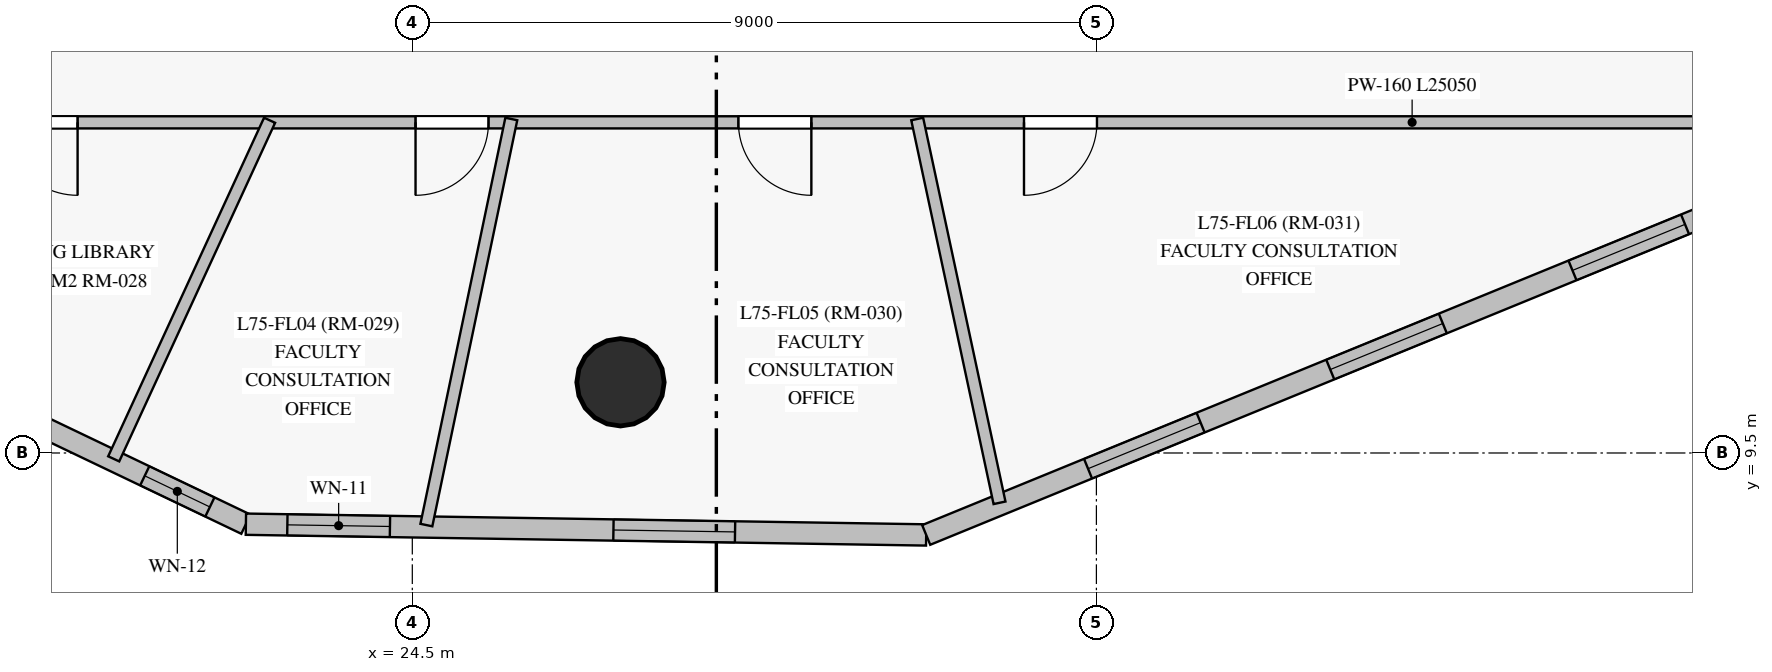
"""IFC4 building model, lengths in metres.
Left out: names, types, materials, properties, quantities, classifications, styles, units other than length and angle.
Written with IfcOpenShell. Run it as: python <this file> out.ifc"""

import sys

from ifc_helpers import new_model, si_unit, direction, frame, frame_2d, origin, origin_with_axes, origin_2d, place, context, subcontext, project, spatial, rectangle, circle, extrude, source, transform, mapped, element, fill, save


model = new_model("IFC4")
c1 = context("Model", 3, precision=1e-05, world=origin(), true_north=direction((0.0, 1.0)))
c2 = subcontext(c1, "Body", "Model", "MODEL_VIEW")
j1 = project(units=[si_unit("LENGTHUNIT", "METRE"), si_unit("PLANEANGLEUNIT", "RADIAN")], contexts=[c1])
p1 = place(None, origin())
s1 = spatial("IfcSite", under=j1, at=p1, CompositionType="ELEMENT")
p2 = place(p1, origin())
s2 = spatial("IfcBuilding", under=s1, at=p2, CompositionType="ELEMENT")
p3 = place(p2, frame((0.0, 0.0, 253.5)))
s3 = spatial("IfcBuildingStorey", under=s2, at=p3, CompositionType="ELEMENT", Elevation=253.5)
m1 = source(origin_with_axes(), c2, "Body", "SweptSolid", [
    extrude(circle(Radius=0.575, at=origin_2d()), origin(), (0.0, 0.0, 1.0), 3.05),
])
p4 = place(p3, frame((27.239, 10.43, 0.0), z_axis=(0.0, 0.0, 1.0), x_axis=(1.0, 0.0, 0.0)))
e1 = element("IfcColumn", 1, at=p4, inside=s3, PredefinedType="COLUMN", context=c2, shape_type="MappedRepresentation", body=[
    mapped(m1, transform((0.0, 0.0, 0.0), scale=1.0)),
])
p5 = place(p3, frame((12.027, 13.482, 0.0), z_axis=(0.0, 0.0, 1.0), x_axis=(0.902132409452, -0.431459286395, 0.0)))
e2 = element("IfcWall", 2, at=p5, inside=s3, PredefinedType="SOLIDWALL", context=c2, shape_type="SweptSolid", body=[
    extrude(rectangle(XDim=11.4, YDim=0.28, at=frame_2d((5.7, 0.0))), origin(), (0.0, 0.0, 1.0), 2.85),
])
p6 = place(p5, frame((1.77, 0.0, 0.85)))
e3 = element("IfcOpeningElement", 3, at=p6, cuts=e2, PredefinedType="OPENING", context=c2, shape_type="SweptSolid", body=[
    extrude(rectangle(XDim=1.6, YDim=1.6, at=frame_2d((0.8, 0.8))), frame((0.0, 0.15, 0.0), z_axis=(0.0, -1.0, 0.0), x_axis=(1.0, 0.0, 0.0)), (0.0, 0.0, 1.0), 0.3),
])
p7 = place(p5, frame((6.149, 0.0, 0.85)))
e4 = element("IfcOpeningElement", 4, at=p7, cuts=e2, PredefinedType="OPENING", context=c2, shape_type="SweptSolid", body=[
    extrude(rectangle(XDim=1.6, YDim=1.6, at=frame_2d((0.8, 0.8))), frame((0.0, 0.15, 0.0), z_axis=(0.0, -1.0, 0.0), x_axis=(1.0, 0.0, 0.0)), (0.0, 0.0, 1.0), 0.3),
])
p8 = place(p5, frame((9.924, 0.0, 0.85)))
e5 = element("IfcOpeningElement", 5, at=p8, cuts=e2, PredefinedType="OPENING", context=c2, shape_type="SweptSolid", body=[
    extrude(rectangle(XDim=0.95, YDim=1.5, at=frame_2d((0.475, 0.75))), frame((0.0, 0.15, 0.0), z_axis=(0.0, -1.0, 0.0), x_axis=(1.0, 0.0, 0.0)), (0.0, 0.0, 1.0), 0.3),
])
p9 = place(p3, frame((22.311, 8.563, 0.0), z_axis=(0.0, 0.0, 1.0), x_axis=(0.999875294772, -0.015792241896, 0.0)))
e6 = element("IfcWall", 6, at=p9, inside=s3, PredefinedType="SOLIDWALL", context=c2, shape_type="SweptSolid", body=[
    extrude(rectangle(XDim=8.951, YDim=0.28, at=frame_2d((4.476, 0.0))), origin(), (0.0, 0.0, 1.0), 2.85),
])
p10 = place(p9, frame((0.545, 0.0, 0.85)))
e7 = element("IfcOpeningElement", 7, at=p10, cuts=e6, PredefinedType="OPENING", context=c2, shape_type="SweptSolid", body=[
    extrude(rectangle(XDim=1.35, YDim=1.6, at=frame_2d((0.675, 0.8))), frame((0.0, 0.15, 0.0), z_axis=(0.0, -1.0, 0.0), x_axis=(1.0, 0.0, 0.0)), (0.0, 0.0, 1.0), 0.3),
])
p11 = place(p9, frame((4.836, 0.0, 0.85)))
e8 = element("IfcOpeningElement", 8, at=p11, cuts=e6, PredefinedType="OPENING", context=c2, shape_type="SweptSolid", body=[
    extrude(rectangle(XDim=1.6, YDim=1.6, at=frame_2d((0.8, 0.8))), frame((0.0, 0.15, 0.0), z_axis=(0.0, -1.0, 0.0), x_axis=(1.0, 0.0, 0.0)), (0.0, 0.0, 1.0), 0.3),
])
p12 = place(p3, frame((31.261, 8.422, 0.0), z_axis=(0.0, 0.0, 1.0), x_axis=(0.925486144164, 0.378781463328, 0.0)))
e9 = element("IfcWall", 9, at=p12, inside=s3, PredefinedType="SOLIDWALL", context=c2, shape_type="SweptSolid", body=[
    extrude(rectangle(XDim=12.089, YDim=0.28, at=frame_2d((6.044, 0.0))), origin(), (0.0, 0.0, 1.0), 2.85),
])
p13 = place(p12, frame((2.301, 0.0, 0.85)))
e10 = element("IfcOpeningElement", 10, at=p13, cuts=e9, PredefinedType="OPENING", context=c2, shape_type="SweptSolid", body=[
    extrude(rectangle(XDim=1.6, YDim=1.6, at=frame_2d((0.8, 0.8))), frame((0.0, 0.15, 0.0), z_axis=(0.0, -1.0, 0.0), x_axis=(1.0, 0.0, 0.0)), (0.0, 0.0, 1.0), 0.3),
])
p14 = place(p12, frame((5.744, 0.0, 0.85)))
e11 = element("IfcOpeningElement", 11, at=p14, cuts=e9, PredefinedType="OPENING", context=c2, shape_type="SweptSolid", body=[
    extrude(rectangle(XDim=1.6, YDim=1.6, at=frame_2d((0.8, 0.8))), frame((0.0, 0.15, 0.0), z_axis=(0.0, -1.0, 0.0), x_axis=(1.0, 0.0, 0.0)), (0.0, 0.0, 1.0), 0.3),
])
p15 = place(p12, frame((9.187, 0.0, 0.85)))
e12 = element("IfcOpeningElement", 12, at=p15, cuts=e9, PredefinedType="OPENING", context=c2, shape_type="SweptSolid", body=[
    extrude(rectangle(XDim=1.6, YDim=1.6, at=frame_2d((0.8, 0.8))), frame((0.0, 0.15, 0.0), z_axis=(0.0, -1.0, 0.0), x_axis=(1.0, 0.0, 0.0)), (0.0, 0.0, 1.0), 0.3),
])
p16 = place(p3, frame((41.8, 13.85, 0.0), z_axis=(0.0, 0.0, 1.0), x_axis=(-1.0, 0.0, 0.0)))
e13 = element("IfcWall", 13, at=p16, inside=s3, PredefinedType="PARTITIONING", context=c2, shape_type="SweptSolid", body=[
    extrude(rectangle(XDim=25.05, YDim=0.16, at=frame_2d((12.525, 0.0))), origin(), (0.0, 0.0, 1.0), 2.3),
])
p17 = place(p16, frame((21.704, 0.0, 0.0)))
e14 = element("IfcOpeningElement", 14, at=p17, cuts=e13, PredefinedType="OPENING", context=c2, shape_type="SweptSolid", body=[
    extrude(rectangle(XDim=0.96, YDim=2.15, at=frame_2d((0.48, 1.075))), frame((0.0, 0.09, 0.0), z_axis=(0.0, -1.0, 0.0), x_axis=(1.0, 0.0, 0.0)), (0.0, 0.0, 1.0), 0.18),
])
p18 = place(p16, frame((16.298, 0.0, 0.0)))
e15 = element("IfcOpeningElement", 15, at=p18, cuts=e13, PredefinedType="OPENING", context=c2, shape_type="SweptSolid", body=[
    extrude(rectangle(XDim=0.96, YDim=2.15, at=frame_2d((0.48, 1.075))), frame((0.0, 0.09, 0.0), z_axis=(0.0, -1.0, 0.0), x_axis=(1.0, 0.0, 0.0)), (0.0, 0.0, 1.0), 0.18),
])
p19 = place(p16, frame((12.05, 0.0, 0.0)))
e16 = element("IfcOpeningElement", 16, at=p19, cuts=e13, PredefinedType="OPENING", context=c2, shape_type="SweptSolid", body=[
    extrude(rectangle(XDim=0.96, YDim=2.15, at=frame_2d((0.48, 1.075))), frame((0.0, 0.09, 0.0), z_axis=(0.0, -1.0, 0.0), x_axis=(1.0, 0.0, 0.0)), (0.0, 0.0, 1.0), 0.18),
])
p20 = place(p16, frame((8.292, 0.0, 0.0)))
e17 = element("IfcOpeningElement", 17, at=p20, cuts=e13, PredefinedType="OPENING", context=c2, shape_type="SweptSolid", body=[
    extrude(rectangle(XDim=0.96, YDim=2.15, at=frame_2d((0.48, 1.075))), frame((0.0, 0.09, 0.0), z_axis=(0.0, -1.0, 0.0), x_axis=(1.0, 0.0, 0.0)), (0.0, 0.0, 1.0), 0.18),
])
p21 = place(p3, frame((25.802, 13.894, 0.0), z_axis=(0.0, 0.0, 1.0), x_axis=(-0.20473658281, -0.978817108381, 0.0)))
e18 = element("IfcWall", 18, at=p21, inside=s3, PredefinedType="PARTITIONING", context=c2, shape_type="SweptSolid", body=[
    extrude(rectangle(XDim=5.458, YDim=0.16, at=frame_2d((2.729, 0.0))), origin(), (0.0, 0.0, 1.0), 2.85),
])
p22 = place(p3, frame((31.143, 13.894, 0.0), z_axis=(0.0, 0.0, 1.0), x_axis=(0.209706650343, -0.977764348298, 0.0)))
e19 = element("IfcWall", 19, at=p22, inside=s3, PredefinedType="PARTITIONING", context=c2, shape_type="SweptSolid", body=[
    extrude(rectangle(XDim=5.164, YDim=0.16, at=frame_2d((2.582, 0.0))), origin(), (0.0, 0.0, 1.0), 2.85),
])
p23 = place(p3, frame((22.622, 13.877, 0.0), z_axis=(0.0, 0.0, 1.0), x_axis=(-0.418205552884, -0.908352418138, 0.0)))
e20 = element("IfcWall", 20, at=p23, inside=s3, PredefinedType="PARTITIONING", context=c2, shape_type="SweptSolid", body=[
    extrude(rectangle(XDim=4.904, YDim=0.16, at=frame_2d((2.452, 0.0))), origin(), (0.0, 0.0, 1.0), 2.85),
])
m2 = source(origin_with_axes(), c2, "Body", "SweptSolid", [
    extrude(rectangle(XDim=0.95, YDim=1.5, at=frame_2d((0.475, 0.75))), frame((0.0, 0.03, 0.0), z_axis=(0.0, -1.0, 0.0), x_axis=(1.0, 0.0, 0.0)), (0.0, 0.0, 1.0), 0.06),
])
p24 = place(p8, origin())
e21 = element("IfcWindow", 21, at=p24, inside=s3, PartitioningType="SINGLE_PANEL", PredefinedType="WINDOW", context=c2, shape_type="MappedRepresentation", body=[
    mapped(m2, transform((0.0, 0.0, 0.0), scale=1.0)),
])
fill(e5, e21)
m3 = source(origin_with_axes(), c2, "Body", "SweptSolid", [
    extrude(rectangle(XDim=1.35, YDim=1.6, at=frame_2d((0.675, 0.8))), frame((0.0, 0.03, 0.0), z_axis=(0.0, -1.0, 0.0), x_axis=(1.0, 0.0, 0.0)), (0.0, 0.0, 1.0), 0.06),
])
p25 = place(p10, origin())
e22 = element("IfcWindow", 22, at=p25, inside=s3, PartitioningType="SINGLE_PANEL", PredefinedType="WINDOW", context=c2, shape_type="MappedRepresentation", body=[
    mapped(m3, transform((0.0, 0.0, 0.0), scale=1.0)),
])
fill(e7, e22)
m4 = source(origin_with_axes(), c2, "Body", "SweptSolid", [
    extrude(rectangle(XDim=1.6, YDim=1.6, at=frame_2d((0.8, 0.8))), frame((0.0, 0.03, 0.0), z_axis=(0.0, -1.0, 0.0), x_axis=(1.0, 0.0, 0.0)), (0.0, 0.0, 1.0), 0.06),
])
p26 = place(p11, origin())
e23 = element("IfcWindow", 23, at=p26, inside=s3, PartitioningType="SINGLE_PANEL", PredefinedType="WINDOW", context=c2, shape_type="MappedRepresentation", body=[
    mapped(m4, transform((0.0, 0.0, 0.0), scale=1.0)),
])
fill(e8, e23)
p27 = place(p13, origin())
e24 = element("IfcWindow", 24, at=p27, inside=s3, PartitioningType="SINGLE_PANEL", PredefinedType="WINDOW", context=c2, shape_type="MappedRepresentation", body=[
    mapped(m4, transform((0.0, 0.0, 0.0), scale=1.0)),
])
fill(e10, e24)
p28 = place(p14, origin())
e25 = element("IfcWindow", 25, at=p28, inside=s3, PartitioningType="SINGLE_PANEL", PredefinedType="WINDOW", context=c2, shape_type="MappedRepresentation", body=[
    mapped(m4, transform((0.0, 0.0, 0.0), scale=1.0)),
])
fill(e11, e25)
p29 = place(p15, origin())
e26 = element("IfcWindow", 26, at=p29, inside=s3, PartitioningType="SINGLE_PANEL", PredefinedType="WINDOW", context=c2, shape_type="MappedRepresentation", body=[
    mapped(m4, transform((0.0, 0.0, 0.0), scale=1.0)),
])
fill(e12, e26)
m5 = source(origin_with_axes(), c2, "Body", "SweptSolid", [
    extrude(rectangle(XDim=0.96, YDim=2.15, at=frame_2d((0.48, 1.075))), frame((0.0, 0.025, 0.0), z_axis=(0.0, -1.0, 0.0), x_axis=(1.0, 0.0, 0.0)), (0.0, 0.0, 1.0), 0.05),
])
p30 = place(p17, origin())
e27 = element("IfcDoor", 27, at=p30, inside=s3, OperationType="SINGLE_SWING_LEFT", PredefinedType="DOOR", context=c2, shape_type="MappedRepresentation", body=[
    mapped(m5, transform((0.0, 0.0, 0.0), scale=1.0)),
])
fill(e14, e27)
p31 = place(p18, origin())
e28 = element("IfcDoor", 28, at=p31, inside=s3, OperationType="SINGLE_SWING_RIGHT", PredefinedType="DOOR", context=c2, shape_type="MappedRepresentation", body=[
    mapped(m5, transform((0.0, 0.0, 0.0), scale=1.0)),
])
fill(e15, e28)
p32 = place(p19, origin())
e29 = element("IfcDoor", 29, at=p32, inside=s3, OperationType="SINGLE_SWING_LEFT", PredefinedType="DOOR", context=c2, shape_type="MappedRepresentation", body=[
    mapped(m5, transform((0.0, 0.0, 0.0), scale=1.0)),
])
fill(e16, e29)
p33 = place(p20, origin())
e30 = element("IfcDoor", 30, at=p33, inside=s3, OperationType="SINGLE_SWING_RIGHT", PredefinedType="DOOR", context=c2, shape_type="MappedRepresentation", body=[
    mapped(m5, transform((0.0, 0.0, 0.0), scale=1.0)),
])
fill(e17, e30)
save(model, sys.argv[1])
